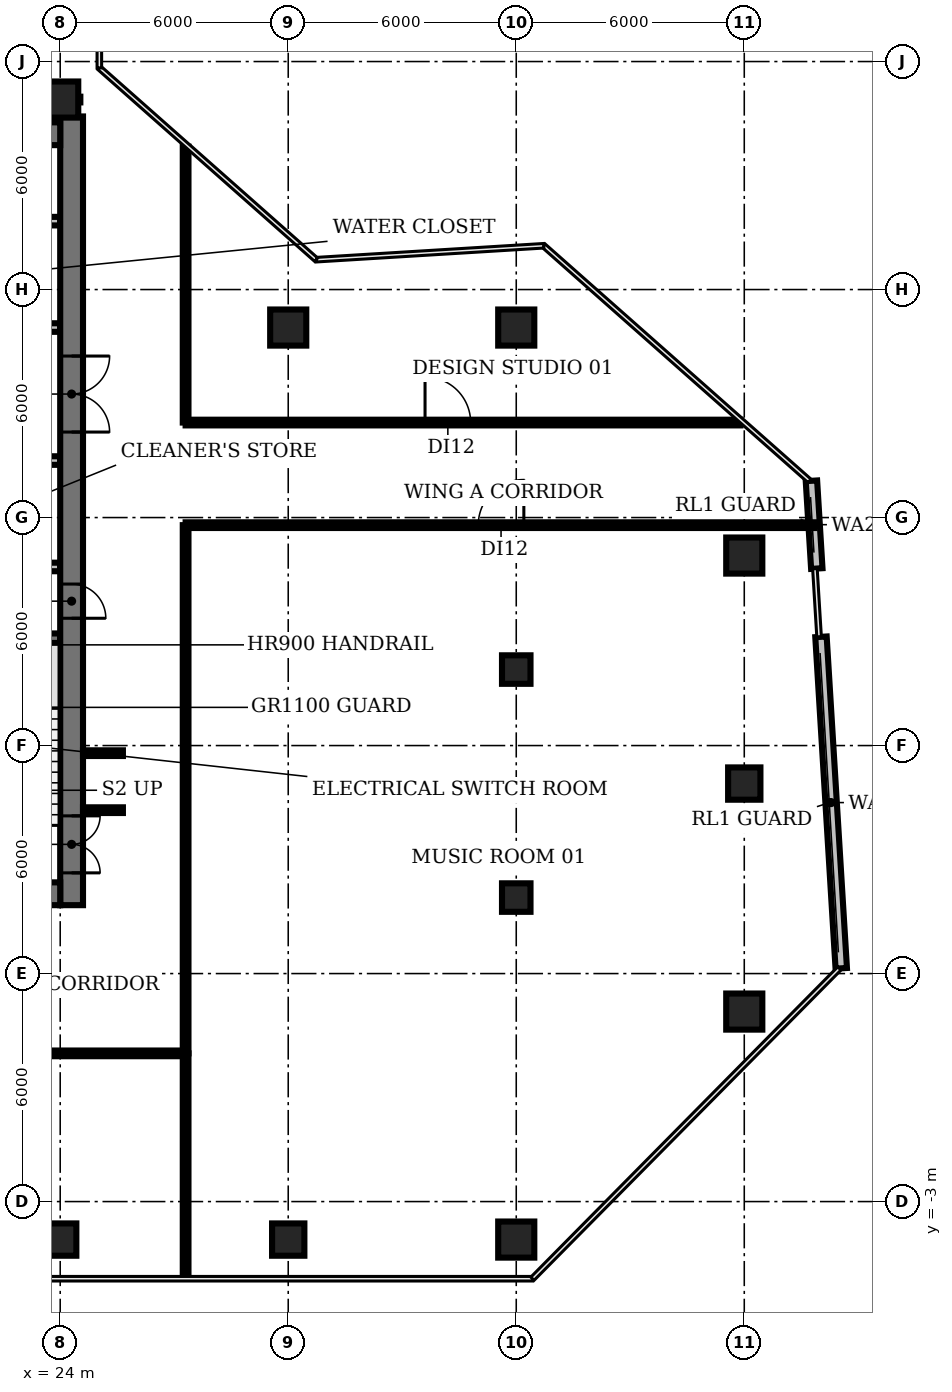
"""IFC4 building model, lengths in metres.
Left out: names, types, materials, properties, quantities, classifications, styles, units other than length and angle.
Written with IfcOpenShell. Run it as: python <this file> out.ifc"""

import sys

from ifc_helpers import new_model, si_unit, direction, frame, frame_2d, origin, origin_2d, place, context, subcontext, project, spatial, rectangle, circle, extrude, element, fill, save


model = new_model("IFC4")
c1 = context("Model", 3, precision=1e-05, world=origin(), true_north=direction((0.0, 1.0)))
c2 = subcontext(c1, "Body", "Model", "MODEL_VIEW")
j1 = project(units=[si_unit("LENGTHUNIT", "METRE"), si_unit("PLANEANGLEUNIT", "RADIAN")], contexts=[c1])
p1 = place(None, origin())
s1 = spatial("IfcSite", under=j1, at=p1, CompositionType="ELEMENT")
p2 = place(p1, origin())
s2 = spatial("IfcBuilding", under=s1, at=p2, CompositionType="ELEMENT")
p3 = place(p2, frame((0.0, 0.0, 184.4)))
s3 = spatial("IfcBuildingStorey", under=s2, at=p3, CompositionType="ELEMENT", Elevation=184.4)
p4 = place(p3, frame((24.0, -4.0, 0.0), z_axis=(0.0, 0.0, 1.0), x_axis=(1.0, 0.0, 0.0)))
e1 = element("IfcColumn", 1, at=p4, inside=s3, PredefinedType="COLUMN", context=c2, shape_type="SweptSolid", body=[
    extrude(rectangle(XDim=0.85, YDim=0.85, at=origin_2d()), origin(), (0.0, 0.0, 1.0), 3.85),
])
p5 = place(p3, frame((24.0, 26.0, 0.0), z_axis=(0.0, 0.0, 1.0), x_axis=(1.0, 0.0, 0.0)))
e2 = element("IfcColumn", 2, at=p5, inside=s3, PredefinedType="COLUMN", context=c2, shape_type="SweptSolid", body=[
    extrude(circle(Radius=0.475, at=origin_2d()), origin(), (0.0, 0.0, 1.0), 3.85),
])
p6 = place(p3, frame((30.0, -4.0, 0.0), z_axis=(0.0, 0.0, 1.0), x_axis=(1.0, 0.0, 0.0)))
e3 = element("IfcColumn", 3, at=p6, inside=s3, PredefinedType="COLUMN", context=c2, shape_type="SweptSolid", body=[
    extrude(rectangle(XDim=0.85, YDim=0.85, at=origin_2d()), origin(), (0.0, 0.0, 1.0), 3.85),
])
for number, where, z_axis, x_axis in (
    (4, (30.0, 20.0, 0.0), (0.0, 0.0, 1.0), (1.0, 0.0, 0.0)),
    (5, (36.0, -4.0, 0.0), (0.0, 0.0, 1.0), (1.0, 0.0, 0.0)),
):
    element("IfcColumn", number, at=place(p3, frame(where, z_axis=z_axis, x_axis=x_axis)), inside=s3, PredefinedType="COLUMN", context=c2, shape_type="SweptSolid", body=[
        extrude(circle(Radius=0.475, at=origin_2d()), origin(), (0.0, 0.0, 1.0), 3.85),
    ])
for number, where, z_axis, x_axis in (
    (6, (36.0, 5.0, 0.0), (0.0, 0.0, 1.0), (1.0, 0.0, 0.0)),
    (7, (36.0, 11.0, 0.0), (0.0, 0.0, 1.0), (1.0, 0.0, 0.0)),
):
    element("IfcColumn", number, at=place(p3, frame(where, z_axis=z_axis, x_axis=x_axis)), inside=s3, PredefinedType="COLUMN", context=c2, shape_type="SweptSolid", body=[
        extrude(rectangle(XDim=0.75, YDim=0.75, at=origin_2d()), origin(), (0.0, 0.0, 1.0), 3.85),
    ])
for number, where, z_axis, x_axis in (
    (8, (36.0, 20.0, 0.0), (0.0, 0.0, 1.0), (1.0, 0.0, 0.0)),
    (9, (42.0, 2.0, 0.0), (0.0, 0.0, 1.0), (1.0, 0.0, 0.0)),
):
    element("IfcColumn", number, at=place(p3, frame(where, z_axis=z_axis, x_axis=x_axis)), inside=s3, PredefinedType="COLUMN", context=c2, shape_type="SweptSolid", body=[
        extrude(circle(Radius=0.475, at=origin_2d()), origin(), (0.0, 0.0, 1.0), 3.85),
    ])
p7 = place(p3, frame((42.0, 8.0, 0.0), z_axis=(0.0, 0.0, 1.0), x_axis=(1.0, 0.0, 0.0)))
e10 = element("IfcColumn", 10, at=p7, inside=s3, PredefinedType="COLUMN", context=c2, shape_type="SweptSolid", body=[
    extrude(rectangle(XDim=0.85, YDim=0.85, at=origin_2d()), origin(), (0.0, 0.0, 1.0), 3.85),
])
p8 = place(p3, frame((42.0, 14.0, 0.0), z_axis=(0.0, 0.0, 1.0), x_axis=(1.0, 0.0, 0.0)))
e11 = element("IfcColumn", 11, at=p8, inside=s3, PredefinedType="COLUMN", context=c2, shape_type="SweptSolid", body=[
    extrude(circle(Radius=0.475, at=origin_2d()), origin(), (0.0, 0.0, 1.0), 3.85),
])
p9 = place(p3, frame((44.552, 3.138, 0.0), z_axis=(0.0, 0.0, 1.0), x_axis=(-0.061063491269, 0.998133883822, 0.0)))
e12 = element("IfcWall", 12, at=p9, inside=s3, PredefinedType="SOLIDWALL", context=c2, shape_type="SweptSolid", body=[
    extrude(rectangle(XDim=8.74, YDim=0.3, at=frame_2d((4.37, 0.0))), origin(), (0.0, 0.0, 1.0), 3.85),
])
p10 = place(p3, frame((43.908, 13.658, 0.0), z_axis=(0.0, 0.0, 1.0), x_axis=(-0.06100491226, 0.998137465823, 0.0)))
e13 = element("IfcWall", 13, at=p10, inside=s3, PredefinedType="SOLIDWALL", context=c2, shape_type="SweptSolid", body=[
    extrude(rectangle(XDim=2.313, YDim=0.3, at=frame_2d((1.157, 0.0))), origin(), (0.0, 0.0, 1.0), 3.85),
])
p11 = place(p3, frame((20.85, 11.825, 0.0), z_axis=(0.0, 0.0, 1.0), x_axis=(1.0, 0.0, 0.0)))
e14 = element("IfcWall", 14, at=p11, inside=s3, PredefinedType="SHEAR", context=c2, shape_type="SweptSolid", body=[
    extrude(rectangle(XDim=3.15, YDim=0.25, at=frame_2d((1.575, 0.0))), origin(), (0.0, 0.0, 1.0), 3.85),
])
p12 = place(p3, frame((16.6, 13.7, 0.0), z_axis=(0.0, 0.0, 1.0), x_axis=(1.0, 0.0, 0.0)))
e15 = element("IfcWall", 15, at=p12, inside=s3, PredefinedType="PARTITIONING", context=c2, shape_type="SweptSolid", body=[
    extrude(rectangle(XDim=7.4, YDim=0.225, at=frame_2d((3.7, 0.0))), origin(), (0.0, 0.0, 1.0), 3.85),
])
p13 = place(p3, frame((9.4, 16.5, 0.0), z_axis=(0.0, 0.0, 1.0), x_axis=(1.0, 0.0, 0.0)))
e16 = element("IfcWall", 16, at=p13, inside=s3, PredefinedType="PARTITIONING", context=c2, shape_type="SweptSolid", body=[
    extrude(rectangle(XDim=14.6, YDim=0.225, at=frame_2d((7.3, 0.0))), origin(), (0.0, 0.0, 1.0), 3.85),
])
p14 = place(p13, frame((1.9, 0.0, 0.0)))
e17 = element("IfcOpeningElement", 17, at=p14, cuts=e16, PredefinedType="OPENING", context=c2, shape_type="SweptSolid", body=[
    extrude(rectangle(XDim=1.0, YDim=2.1, at=frame_2d((0.5, 1.05))), frame((0.0, 0.123, 0.0), z_axis=(0.0, -1.0, 0.0), x_axis=(1.0, 0.0, 0.0)), (0.0, 0.0, 1.0), 0.245),
])
p15 = place(p13, frame((7.475, 0.0, 0.0)))
e18 = element("IfcOpeningElement", 18, at=p15, cuts=e16, PredefinedType="OPENING", context=c2, shape_type="SweptSolid", body=[
    extrude(rectangle(XDim=1.0, YDim=2.1, at=frame_2d((0.5, 1.05))), frame((0.0, 0.123, 0.0), z_axis=(0.0, -1.0, 0.0), x_axis=(1.0, 0.0, 0.0)), (0.0, 0.0, 1.0), 0.245),
])
p16 = place(p13, frame((12.4, 0.0, 0.0)))
e19 = element("IfcOpeningElement", 19, at=p16, cuts=e16, PredefinedType="OPENING", context=c2, shape_type="SweptSolid", body=[
    extrude(rectangle(XDim=1.0, YDim=2.1, at=frame_2d((0.5, 1.05))), frame((0.0, 0.123, 0.0), z_axis=(0.0, -1.0, 0.0), x_axis=(1.0, 0.0, 0.0)), (0.0, 0.0, 1.0), 0.245),
])
p17 = place(p3, frame((24.0, 20.0, 0.0), z_axis=(0.0, 0.0, 1.0), x_axis=(-1.0, 0.0, 0.0)))
e20 = element("IfcWall", 20, at=p17, inside=s3, PredefinedType="PARTITIONING", context=c2, shape_type="SweptSolid", body=[
    extrude(rectangle(XDim=14.6, YDim=0.225, at=frame_2d((7.3, 0.0))), origin(), (0.0, 0.0, 1.0), 3.85),
])
p18 = place(p17, frame((12.75, 0.0, 0.0)))
e21 = element("IfcOpeningElement", 21, at=p18, cuts=e20, PredefinedType="OPENING", context=c2, shape_type="SweptSolid", body=[
    extrude(rectangle(XDim=1.1, YDim=2.1, at=frame_2d((0.55, 1.05))), frame((0.0, 0.123, 0.0), z_axis=(0.0, -1.0, 0.0), x_axis=(1.0, 0.0, 0.0)), (0.0, 0.0, 1.0), 0.245),
])
p19 = place(p17, frame((9.95, 0.0, 0.0)))
e22 = element("IfcOpeningElement", 22, at=p19, cuts=e20, PredefinedType="OPENING", context=c2, shape_type="SweptSolid", body=[
    extrude(rectangle(XDim=1.1, YDim=2.1, at=frame_2d((0.55, 1.05))), frame((0.0, 0.123, 0.0), z_axis=(0.0, -1.0, 0.0), x_axis=(1.0, 0.0, 0.0)), (0.0, 0.0, 1.0), 0.245),
])
p20 = place(p17, frame((7.15, 0.0, 0.0)))
e23 = element("IfcOpeningElement", 23, at=p20, cuts=e20, PredefinedType="OPENING", context=c2, shape_type="SweptSolid", body=[
    extrude(rectangle(XDim=1.1, YDim=2.1, at=frame_2d((0.55, 1.05))), frame((0.0, 0.123, 0.0), z_axis=(0.0, -1.0, 0.0), x_axis=(1.0, 0.0, 0.0)), (0.0, 0.0, 1.0), 0.245),
])
p21 = place(p17, frame((4.35, 0.0, 0.0)))
e24 = element("IfcOpeningElement", 24, at=p21, cuts=e20, PredefinedType="OPENING", context=c2, shape_type="SweptSolid", body=[
    extrude(rectangle(XDim=1.1, YDim=2.1, at=frame_2d((0.55, 1.05))), frame((0.0, 0.123, 0.0), z_axis=(0.0, -1.0, 0.0), x_axis=(1.0, 0.0, 0.0)), (0.0, 0.0, 1.0), 0.245),
])
p22 = place(p17, frame((1.2, 0.0, 0.0)))
e25 = element("IfcOpeningElement", 25, at=p22, cuts=e20, PredefinedType="OPENING", context=c2, shape_type="SweptSolid", body=[
    extrude(rectangle(XDim=1.0, YDim=2.1, at=frame_2d((0.5, 1.05))), frame((0.0, 0.123, 0.0), z_axis=(0.0, -1.0, 0.0), x_axis=(1.0, 0.0, 0.0)), (0.0, 0.0, 1.0), 0.245),
])
p23 = place(p3, frame((9.4, 22.8, 0.0), z_axis=(0.0, 0.0, 1.0), x_axis=(1.0, 0.0, 0.0)))
e26 = element("IfcWall", 26, at=p23, inside=s3, PredefinedType="PARTITIONING", context=c2, shape_type="SweptSolid", body=[
    extrude(rectangle(XDim=14.6, YDim=0.225, at=frame_2d((7.3, 0.0))), origin(), (0.0, 0.0, 1.0), 3.85),
])
p24 = place(p3, frame((24.3, 25.555, 0.0), z_axis=(0.0, 0.0, 1.0), x_axis=(0.0, -1.0, 0.0)))
e27 = element("IfcWall", 27, at=p24, inside=s3, PredefinedType="SHEAR", context=c2, shape_type="SweptSolid", body=[
    extrude(rectangle(XDim=20.755, YDim=0.6, at=frame_2d((10.377, 0.0))), origin(), (0.0, 0.0, 1.0), 3.85),
])
p25 = place(p24, frame((18.405, 0.0, 0.0)))
e28 = element("IfcOpeningElement", 28, at=p25, cuts=e27, PredefinedType="OPENING", context=c2, shape_type="SweptSolid", body=[
    extrude(rectangle(XDim=1.5, YDim=2.1, at=frame_2d((0.75, 1.05))), frame((0.0, 0.31, 0.0), z_axis=(0.0, -1.0, 0.0), x_axis=(1.0, 0.0, 0.0)), (0.0, 0.0, 1.0), 0.62),
])
p26 = place(p24, frame((12.305, 0.0, 0.0)))
e29 = element("IfcOpeningElement", 29, at=p26, cuts=e27, PredefinedType="OPENING", context=c2, shape_type="SweptSolid", body=[
    extrude(rectangle(XDim=0.9, YDim=2.1, at=frame_2d((0.45, 1.05))), frame((0.0, 0.31, 0.0), z_axis=(0.0, -1.0, 0.0), x_axis=(1.0, 0.0, 0.0)), (0.0, 0.0, 1.0), 0.62),
])
p27 = place(p24, frame((6.305, 0.0, 0.0)))
e30 = element("IfcOpeningElement", 30, at=p27, cuts=e27, PredefinedType="OPENING", context=c2, shape_type="SweptSolid", body=[
    extrude(rectangle(XDim=2.0, YDim=2.1, at=frame_2d((1.0, 1.05))), frame((0.0, 0.31, 0.0), z_axis=(0.0, -1.0, 0.0), x_axis=(1.0, 0.0, 0.0)), (0.0, 0.0, 1.0), 0.62),
])
p28 = place(p3, frame((24.0, 5.1, 0.0), z_axis=(0.0, 0.0, 1.0), x_axis=(-1.0, 0.0, 0.0)))
e31 = element("IfcWall", 31, at=p28, inside=s3, PredefinedType="SHEAR", context=c2, shape_type="SweptSolid", body=[
    extrude(rectangle(XDim=18.0, YDim=0.6, at=frame_2d((9.0, 0.0))), origin(), (0.0, 0.0, 1.0), 3.85),
])
p29 = place(p28, frame((13.0, 0.0, 0.0)))
e32 = element("IfcOpeningElement", 32, at=p29, cuts=e31, PredefinedType="OPENING", context=c2, shape_type="SweptSolid", body=[
    extrude(rectangle(XDim=1.2, YDim=2.1, at=frame_2d((0.6, 1.05))), frame((0.0, 0.31, 0.0), z_axis=(0.0, -1.0, 0.0), x_axis=(1.0, 0.0, 0.0)), (0.0, 0.0, 1.0), 0.62),
])
p30 = place(p28, frame((4.9, 0.0, 0.0)))
e33 = element("IfcOpeningElement", 33, at=p30, cuts=e31, PredefinedType="OPENING", context=c2, shape_type="SweptSolid", body=[
    extrude(rectangle(XDim=1.0, YDim=2.1, at=frame_2d((0.5, 1.05))), frame((0.0, 0.31, 0.0), z_axis=(0.0, -1.0, 0.0), x_axis=(1.0, 0.0, 0.0)), (0.0, 0.0, 1.0), 0.62),
])
p31 = place(p3, frame((6.0, 25.1, 0.0), z_axis=(0.0, 0.0, 1.0), x_axis=(1.0, 0.0, 0.0)))
e34 = element("IfcWall", 34, at=p31, inside=s3, PredefinedType="SHEAR", context=c2, shape_type="SweptSolid", body=[
    extrude(rectangle(XDim=18.0, YDim=0.6, at=frame_2d((9.0, 0.0))), origin(), (0.0, 0.0, 1.0), 3.85),
])
p32 = place(p3, frame((23.48, 26.0, 0.0), z_axis=(0.0, 0.0, 1.0), x_axis=(1.0, 0.0, 0.0)))
e35 = element("IfcWall", 35, at=p32, inside=s3, PredefinedType="PARTITIONING", context=c2, shape_type="SweptSolid", body=[
    extrude(rectangle(XDim=1.05, YDim=0.15, at=frame_2d((0.525, 0.0))), origin(), (0.0, 0.0, 1.0), 2.88),
])
for number, where, z_axis, x_axis in (
    (36, (24.6, 7.3, 0.0), (0.0, 0.0, 1.0), (1.0, 0.0, 0.0)),
    (37, (24.6, 8.8, 0.0), (0.0, 0.0, 1.0), (1.0, 0.0, 0.0)),
):
    element("IfcWall", number, at=place(p3, frame(where, z_axis=z_axis, x_axis=x_axis)), inside=s3, PredefinedType="PARTITIONING", context=c2, shape_type="SweptSolid", body=[
        extrude(rectangle(XDim=1.05, YDim=0.15, at=frame_2d((0.525, 0.0))), origin(), (0.0, 0.0, 1.0), 2.88),
    ])
p33 = place(p3, frame((27.3, -4.98, 0.0), z_axis=(0.0, 0.0, 1.0), x_axis=(0.0, 1.0, 0.0)))
e38 = element("IfcWall", 38, at=p33, inside=s3, PredefinedType="PARTITIONING", context=c2, shape_type="SweptSolid", body=[
    extrude(rectangle(XDim=5.88, YDim=0.15, at=frame_2d((2.94, 0.0))), origin(), (0.0, 0.0, 1.0), 2.88),
])
p34 = place(p3, frame((27.3, 0.9, 0.0), z_axis=(0.0, 0.0, 1.0), x_axis=(-1.0, 0.0, 0.0)))
e39 = element("IfcWall", 39, at=p34, inside=s3, PredefinedType="PARTITIONING", context=c2, shape_type="SweptSolid", body=[
    extrude(rectangle(XDim=24.6, YDim=0.15, at=frame_2d((12.3, 0.0))), origin(), (0.0, 0.0, 1.0), 2.88),
])
p35 = place(p34, frame((11.8, 0.0, 0.0)))
e40 = element("IfcOpeningElement", 40, at=p35, cuts=e39, PredefinedType="OPENING", context=c2, shape_type="SweptSolid", body=[
    extrude(rectangle(XDim=1.2, YDim=2.1, at=frame_2d((0.6, 1.05))), frame((0.0, 0.085, 0.0), z_axis=(0.0, -1.0, 0.0), x_axis=(1.0, 0.0, 0.0)), (0.0, 0.0, 1.0), 0.17),
])
p36 = place(p3, frame((27.3, 0.9, 0.0), z_axis=(0.0, 0.0, 1.0), x_axis=(0.0, 1.0, 0.0)))
e41 = element("IfcWall", 41, at=p36, inside=s3, PredefinedType="PARTITIONING", context=c2, shape_type="SweptSolid", body=[
    extrude(rectangle(XDim=13.9, YDim=0.15, at=frame_2d((6.95, 0.0))), origin(), (0.0, 0.0, 1.0), 2.88),
])
p37 = place(p3, frame((27.3, 14.8, 0.0), z_axis=(0.0, 0.0, 1.0), x_axis=(1.0, 0.0, 0.0)))
e42 = element("IfcWall", 42, at=p37, inside=s3, PredefinedType="PARTITIONING", context=c2, shape_type="SweptSolid", body=[
    extrude(rectangle(XDim=16.549, YDim=0.15, at=frame_2d((8.274, 0.0))), origin(), (0.0, 0.0, 1.0), 2.88),
])
p38 = place(p37, frame((7.7, 0.0, 0.0)))
e43 = element("IfcOpeningElement", 43, at=p38, cuts=e42, PredefinedType="OPENING", context=c2, shape_type="SweptSolid", body=[
    extrude(rectangle(XDim=1.2, YDim=2.1, at=frame_2d((0.6, 1.05))), frame((0.0, 0.085, 0.0), z_axis=(0.0, -1.0, 0.0), x_axis=(1.0, 0.0, 0.0)), (0.0, 0.0, 1.0), 0.17),
])
p39 = place(p3, frame((27.3, 17.5, 0.0), z_axis=(0.0, 0.0, 1.0), x_axis=(0.0, 1.0, 0.0)))
e44 = element("IfcWall", 44, at=p39, inside=s3, PredefinedType="PARTITIONING", context=c2, shape_type="SweptSolid", body=[
    extrude(rectangle(XDim=7.26, YDim=0.15, at=frame_2d((3.63, 0.0))), origin(), (0.0, 0.0, 1.0), 2.88),
])
p40 = place(p3, frame((27.3, 17.5, 0.0), z_axis=(0.0, 0.0, 1.0), x_axis=(1.0, 0.0, 0.0)))
e45 = element("IfcWall", 45, at=p40, inside=s3, PredefinedType="PARTITIONING", context=c2, shape_type="SweptSolid", body=[
    extrude(rectangle(XDim=14.6, YDim=0.15, at=frame_2d((7.3, 0.0))), origin(), (0.0, 0.0, 1.0), 2.88),
])
p41 = place(p40, frame((6.3, 0.0, 0.0)))
e46 = element("IfcOpeningElement", 46, at=p41, cuts=e45, PredefinedType="OPENING", context=c2, shape_type="SweptSolid", body=[
    extrude(rectangle(XDim=1.2, YDim=2.1, at=frame_2d((0.6, 1.05))), frame((0.0, 0.085, 0.0), z_axis=(0.0, -1.0, 0.0), x_axis=(1.0, 0.0, 0.0)), (0.0, 0.0, 1.0), 0.17),
])
p42 = place(p25, origin())
e47 = element("IfcDoor", 47, at=p42, inside=s3, OperationType="DOUBLE_DOOR_SINGLE_SWING", PredefinedType="DOOR", context=c2, shape_type="SweptSolid", body=[
    extrude(rectangle(XDim=1.5, YDim=2.1, at=frame_2d((0.75, 1.05))), frame((0.0, 0.025, 0.0), z_axis=(0.0, -1.0, 0.0), x_axis=(1.0, 0.0, 0.0)), (0.0, 0.0, 1.0), 0.05),
])
fill(e28, e47)
p43 = place(p26, origin())
e48 = element("IfcDoor", 48, at=p43, inside=s3, OperationType="SINGLE_SWING_RIGHT", PredefinedType="DOOR", context=c2, shape_type="SweptSolid", body=[
    extrude(rectangle(XDim=0.9, YDim=2.1, at=frame_2d((0.45, 1.05))), frame((0.0, -0.24, 0.0), z_axis=(0.0, -1.0, 0.0), x_axis=(1.0, 0.0, 0.0)), (0.0, 0.0, 1.0), 0.05),
])
fill(e29, e48)
p44 = place(p27, origin())
e49 = element("IfcDoor", 49, at=p44, inside=s3, OperationType="DOUBLE_DOOR_SINGLE_SWING", PredefinedType="DOOR", context=c2, shape_type="SweptSolid", body=[
    extrude(rectangle(XDim=2.0, YDim=2.1, at=frame_2d((1.0, 1.05))), frame((0.0, 0.025, 0.0), z_axis=(0.0, -1.0, 0.0), x_axis=(1.0, 0.0, 0.0)), (0.0, 0.0, 1.0), 0.05),
])
fill(e30, e49)
p45 = place(p38, origin())
e50 = element("IfcDoor", 50, at=p45, inside=s3, OperationType="SINGLE_SWING_RIGHT", PredefinedType="DOOR", context=c2, shape_type="SweptSolid", body=[
    extrude(rectangle(XDim=1.2, YDim=2.1, at=frame_2d((0.6, 1.05))), frame((0.0, 0.025, 0.0), z_axis=(0.0, -1.0, 0.0), x_axis=(1.0, 0.0, 0.0)), (0.0, 0.0, 1.0), 0.05),
])
fill(e43, e50)
p46 = place(p41, origin())
e51 = element("IfcDoor", 51, at=p46, inside=s3, OperationType="SINGLE_SWING_LEFT", PredefinedType="DOOR", context=c2, shape_type="SweptSolid", body=[
    extrude(rectangle(XDim=1.2, YDim=2.1, at=frame_2d((0.6, 1.05))), frame((0.0, 0.025, 0.0), z_axis=(0.0, -1.0, 0.0), x_axis=(1.0, 0.0, 0.0)), (0.0, 0.0, 1.0), 0.05),
])
fill(e46, e51)
save(model, sys.argv[1])
